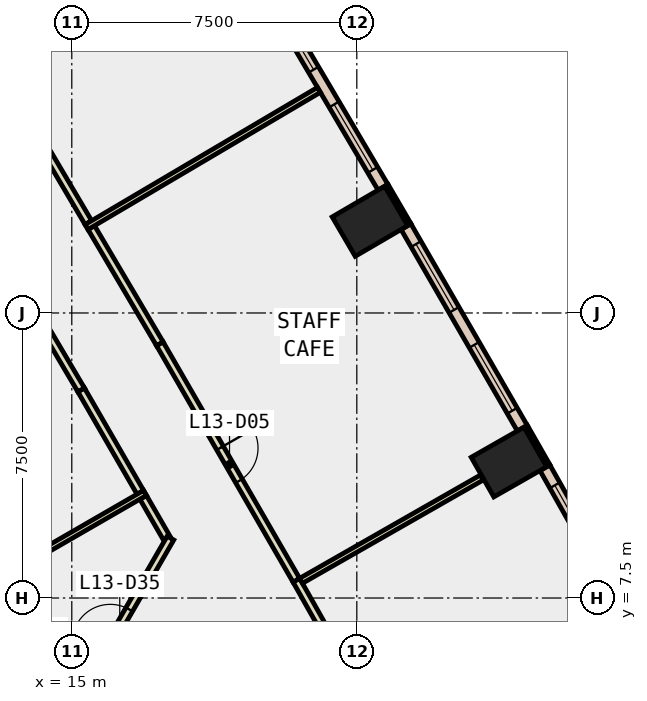
"""IFC4 building model, lengths in metres.
Left out: names, types, materials, properties, quantities, classifications, styles, units other than length and angle.
Written with IfcOpenShell. Run it as: python <this file> out.ifc"""

import sys

from ifc_helpers import new_model, si_unit, direction, frame, frame_2d, origin, origin_2d, place, context, subcontext, project, spatial, rectangle, extrude, element, fill, save


model = new_model("IFC4")
c1 = context("Model", 3, precision=1e-05, world=origin(), true_north=direction((0.0, 1.0)))
c2 = subcontext(c1, "Body", "Model", "MODEL_VIEW")
j1 = project(units=[si_unit("LENGTHUNIT", "METRE"), si_unit("PLANEANGLEUNIT", "RADIAN")], contexts=[c1])
p1 = place(None, origin())
s1 = spatial("IfcSite", under=j1, at=p1, CompositionType="ELEMENT")
p2 = place(p1, origin())
s2 = spatial("IfcBuilding", under=s1, at=p2, CompositionType="ELEMENT")
p3 = place(p2, frame((0.0, 0.0, 64.4)))
s3 = spatial("IfcBuildingStorey", under=s2, at=p3, CompositionType="ELEMENT", Elevation=64.4)
for number, where, z_axis, x_axis in (
    (1, (26.503, 11.078, -0.4), (0.0, 0.0, 1.0), (-0.496, 0.869, 0.0)),
    (2, (22.846, 17.413, -0.4), (0.0, 0.0, 1.0), (-0.504, 0.864, 0.0)),
):
    element("IfcColumn", number, at=place(p3, frame(where, z_axis=z_axis, x_axis=x_axis)), inside=s3, PredefinedType="COLUMN", context=c2, shape_type="SweptSolid", body=[
        extrude(rectangle(XDim=1.2, YDim=1.6, at=origin_2d()), origin(), (0.0, 0.0, 1.0), 4.2),
    ])
p4 = place(p3, frame((27.539, 10.978, 0.0), z_axis=(0.0, 0.0, 1.0), x_axis=(-0.495854054996, 0.868405870629, 0.0)))
e3 = element("IfcWall", 3, at=p4, inside=s3, PredefinedType="STANDARD", context=c2, shape_type="SweptSolid", body=[
    extrude(rectangle(XDim=1.2, YDim=0.1, at=frame_2d((0.6, 0.0))), origin(), (0.0, 0.0, 1.0), 3.8),
])
p5 = place(p3, frame((23.882, 17.324, 0.0), z_axis=(0.0, 0.0, 1.0), x_axis=(-0.504225229382, 0.863572184623, 0.0)))
e4 = element("IfcWall", 4, at=p5, inside=s3, PredefinedType="STANDARD", context=c2, shape_type="SweptSolid", body=[
    extrude(rectangle(XDim=1.2, YDim=0.1, at=frame_2d((0.6, 0.0))), origin(), (0.0, 0.0, 1.0), 3.8),
])
p6 = place(p3, frame((30.462, 5.595, 0.0), z_axis=(0.0, 0.0, 1.0), x_axis=(-0.491887822214, 0.870658584267, 0.0)))
e5 = element("IfcWall", 5, at=p6, inside=s3, PredefinedType="STANDARD", context=c2, shape_type="SweptSolid", body=[
    extrude(rectangle(XDim=6.125, YDim=0.3, at=frame_2d((3.062, 0.0))), origin(), (0.0, 0.0, 1.0), 3.8),
])
p7 = place(p6, frame((0.531, 0.0, 0.9)))
e6 = element("IfcOpeningElement", 6, at=p7, cuts=e5, PredefinedType="OPENING", context=c2, shape_type="SweptSolid", body=[
    extrude(rectangle(XDim=2.0, YDim=2.6, at=frame_2d((1.0, 1.3))), frame((0.0, 0.16, 0.0), z_axis=(0.0, -1.0, 0.0), x_axis=(1.0, 0.0, 0.0)), (0.0, 0.0, 1.0), 0.32),
])
p8 = place(p6, frame((3.594, 0.0, 0.9)))
e7 = element("IfcOpeningElement", 7, at=p8, cuts=e5, PredefinedType="OPENING", context=c2, shape_type="SweptSolid", body=[
    extrude(rectangle(XDim=2.0, YDim=2.6, at=frame_2d((1.0, 1.3))), frame((0.0, 0.16, 0.0), z_axis=(0.0, -1.0, 0.0), x_axis=(1.0, 0.0, 0.0)), (0.0, 0.0, 1.0), 0.32),
])
p9 = place(p3, frame((26.855, 11.968, 0.0), z_axis=(0.0, 0.0, 1.0), x_axis=(-0.499903021601, 0.86608138705, 0.0)))
e8 = element("IfcWall", 8, at=p9, inside=s3, PredefinedType="STANDARD", context=c2, shape_type="SweptSolid", body=[
    extrude(rectangle(XDim=6.125, YDim=0.3, at=frame_2d((3.062, 0.0))), origin(), (0.0, 0.0, 1.0), 3.8),
])
p10 = place(p9, frame((0.531, 0.0, 0.9)))
e9 = element("IfcOpeningElement", 9, at=p10, cuts=e8, PredefinedType="OPENING", context=c2, shape_type="SweptSolid", body=[
    extrude(rectangle(XDim=2.0, YDim=2.6, at=frame_2d((1.0, 1.3))), frame((0.0, 0.16, 0.0), z_axis=(0.0, -1.0, 0.0), x_axis=(1.0, 0.0, 0.0)), (0.0, 0.0, 1.0), 0.32),
])
p11 = place(p9, frame((3.594, 0.0, 0.9)))
e10 = element("IfcOpeningElement", 10, at=p11, cuts=e8, PredefinedType="OPENING", context=c2, shape_type="SweptSolid", body=[
    extrude(rectangle(XDim=2.0, YDim=2.6, at=frame_2d((1.0, 1.3))), frame((0.0, 0.16, 0.0), z_axis=(0.0, -1.0, 0.0), x_axis=(1.0, 0.0, 0.0)), (0.0, 0.0, 1.0), 0.32),
])
p12 = place(p3, frame((23.189, 18.307, 0.0), z_axis=(0.0, 0.0, 1.0), x_axis=(-0.508163938648, 0.861260362177, 0.0)))
e11 = element("IfcWall", 11, at=p12, inside=s3, PredefinedType="STANDARD", context=c2, shape_type="SweptSolid", body=[
    extrude(rectangle(XDim=6.126, YDim=0.3, at=frame_2d((3.063, 0.0))), origin(), (0.0, 0.0, 1.0), 3.8),
])
p13 = place(p12, frame((0.531, 0.0, 0.9)))
e12 = element("IfcOpeningElement", 12, at=p13, cuts=e11, PredefinedType="OPENING", context=c2, shape_type="SweptSolid", body=[
    extrude(rectangle(XDim=2.0, YDim=2.6, at=frame_2d((1.0, 1.3))), frame((0.0, 0.16, 0.0), z_axis=(0.0, -1.0, 0.0), x_axis=(1.0, 0.0, 0.0)), (0.0, 0.0, 1.0), 0.32),
])
p14 = place(p12, frame((3.594, 0.0, 0.9)))
e13 = element("IfcOpeningElement", 13, at=p14, cuts=e11, PredefinedType="OPENING", context=c2, shape_type="SweptSolid", body=[
    extrude(rectangle(XDim=2.0, YDim=2.6, at=frame_2d((1.0, 1.3))), frame((0.0, 0.16, 0.0), z_axis=(0.0, -1.0, 0.0), x_axis=(1.0, 0.0, 0.0)), (0.0, 0.0, 1.0), 0.32),
])
p15 = place(p3, frame((17.497, 9.078, 0.0), z_axis=(0.0, 0.0, 1.0), x_axis=(-0.500126451326, 0.865952384768, 0.0)))
e14 = element("IfcWall", 14, at=p15, inside=s3, PredefinedType="PARTITIONING", context=c2, shape_type="SweptSolid", body=[
    extrude(rectangle(XDim=1.238, YDim=0.2, at=frame_2d((0.619, 0.0))), origin(), (0.0, 0.0, 1.0), 3.8),
])
p16 = place(p3, frame((16.803, 10.28, 0.0), z_axis=(0.0, 0.0, 1.0), x_axis=(-0.499941881293, 0.866058956036, 0.0)))
e15 = element("IfcWall", 15, at=p16, inside=s3, PredefinedType="PARTITIONING", context=c2, shape_type="SweptSolid", body=[
    extrude(rectangle(XDim=3.114, YDim=0.2, at=frame_2d((1.557, 0.0))), origin(), (0.0, 0.0, 1.0), 3.8),
])
p17 = place(p3, frame((15.246, 12.977, 0.0), z_axis=(0.0, 0.0, 1.0), x_axis=(-0.508473864329, 0.861077423519, 0.0)))
e16 = element("IfcWall", 16, at=p17, inside=s3, PredefinedType="PARTITIONING", context=c2, shape_type="SweptSolid", body=[
    extrude(rectangle(XDim=1.9, YDim=0.2, at=frame_2d((0.95, 0.0))), origin(), (0.0, 0.0, 1.0), 3.8),
])
p18 = place(p3, frame((20.909, 7.969, 0.0), z_axis=(0.0, 0.0, 1.0), x_axis=(0.491808171064, -0.870703579225, 0.0)))
e17 = element("IfcWall", 17, at=p18, inside=s3, PredefinedType="PARTITIONING", context=c2, shape_type="SweptSolid", body=[
    extrude(rectangle(XDim=7.332, YDim=0.2, at=frame_2d((3.666, 0.0))), origin(), (0.0, 0.0, 1.0), 3.8),
])
p19 = place(p18, frame((3.166, 0.0, 0.0)))
e18 = element("IfcOpeningElement", 18, at=p19, cuts=e17, PredefinedType="OPENING", context=c2, shape_type="SweptSolid", body=[
    extrude(rectangle(XDim=1.0, YDim=2.1, at=frame_2d((0.5, 1.05))), frame((0.0, 0.11, 0.0), z_axis=(0.0, -1.0, 0.0), x_axis=(1.0, 0.0, 0.0)), (0.0, 0.0, 1.0), 0.22),
])
p20 = place(p3, frame((15.512, 17.248, 0.0), z_axis=(0.0, 0.0, 1.0), x_axis=(0.508178415101, -0.861251820564, 0.0)))
e19 = element("IfcWall", 19, at=p20, inside=s3, PredefinedType="PARTITIONING", context=c2, shape_type="SweptSolid", body=[
    extrude(rectangle(XDim=3.554, YDim=0.2, at=frame_2d((1.777, 0.0))), origin(), (0.0, 0.0, 1.0), 3.8),
])
p21 = place(p3, frame((17.318, 14.187, 0.0), z_axis=(0.0, 0.0, 1.0), x_axis=(0.499986381413, -0.866033266336, 0.0)))
e20 = element("IfcWall", 20, at=p21, inside=s3, PredefinedType="PARTITIONING", context=c2, shape_type="SweptSolid", body=[
    extrude(rectangle(XDim=7.18, YDim=0.2, at=frame_2d((3.59, 0.0))), origin(), (0.0, 0.0, 1.0), 3.8),
])
p22 = place(p21, frame((3.165, 0.0, 0.0)))
e21 = element("IfcOpeningElement", 21, at=p22, cuts=e20, PredefinedType="OPENING", context=c2, shape_type="SweptSolid", body=[
    extrude(rectangle(XDim=1.0, YDim=2.1, at=frame_2d((0.5, 1.05))), frame((0.0, 0.11, 0.0), z_axis=(0.0, -1.0, 0.0), x_axis=(1.0, 0.0, 0.0)), (0.0, 0.0, 1.0), 0.22),
])
p23 = place(p3, frame((13.63, 20.437, 0.0), z_axis=(0.0, 0.0, 1.0), x_axis=(0.508298695021, -0.861180838523, 0.0)))
e22 = element("IfcWall", 22, at=p23, inside=s3, PredefinedType="PARTITIONING", context=c2, shape_type="SweptSolid", body=[
    extrude(rectangle(XDim=3.553, YDim=0.2, at=frame_2d((1.777, 0.0))), origin(), (0.0, 0.0, 1.0), 3.8),
])
p24 = place(p3, frame((11.261, 6.994, 0.0), z_axis=(0.0, 0.0, 1.0), x_axis=(0.866043905515, 0.499967952693, 0.0)))
e23 = element("IfcWall", 23, at=p24, inside=s3, PredefinedType="PARTITIONING", context=c2, shape_type="SweptSolid", body=[
    extrude(rectangle(XDim=6.542, YDim=0.15, at=frame_2d((3.271, 0.0))), origin(), (0.0, 0.0, 1.0), 3.8),
])
p25 = place(p3, frame((13.827, 2.55, 0.0), z_axis=(0.0, 0.0, 1.0), x_axis=(0.500116794417, 0.865957961995, 0.0)))
e24 = element("IfcWall", 24, at=p25, inside=s3, PredefinedType="PARTITIONING", context=c2, shape_type="SweptSolid", body=[
    extrude(rectangle(XDim=7.538, YDim=0.2, at=frame_2d((3.769, 0.0))), origin(), (0.0, 0.0, 1.0), 3.8),
])
p26 = place(p25, frame((3.269, 0.0, 0.0)))
e25 = element("IfcOpeningElement", 25, at=p26, cuts=e24, PredefinedType="OPENING", context=c2, shape_type="SweptSolid", body=[
    extrude(rectangle(XDim=1.0, YDim=2.1, at=frame_2d((0.5, 1.05))), frame((0.0, 0.11, 0.0), z_axis=(0.0, -1.0, 0.0), x_axis=(1.0, 0.0, 0.0)), (0.0, 0.0, 1.0), 0.22),
])
p27 = place(p25, frame((4.369, 0.0, 0.0)))
e26 = element("IfcOpeningElement", 26, at=p27, cuts=e24, PredefinedType="OPENING", context=c2, shape_type="SweptSolid", body=[
    extrude(rectangle(XDim=1.0, YDim=2.1, at=frame_2d((0.5, 1.05))), frame((0.0, 0.11, 0.0), z_axis=(0.0, -1.0, 0.0), x_axis=(1.0, 0.0, 0.0)), (0.0, 0.0, 1.0), 0.22),
])
p28 = place(p3, frame((21.033, 7.953, 0.0), z_axis=(0.0, 0.0, 1.0), x_axis=(0.868311678357, 0.496018980715, 0.0)))
e27 = element("IfcWall", 27, at=p28, inside=s3, PredefinedType="PARTITIONING", context=c2, shape_type="SweptSolid", body=[
    extrude(rectangle(XDim=5.48, YDim=0.15, at=frame_2d((2.74, 0.0))), origin(), (0.0, 0.0, 1.0), 3.8),
])
p29 = place(p3, frame((15.388, 17.261, 0.0), z_axis=(0.0, 0.0, 1.0), x_axis=(0.861189945173, 0.50828326584, 0.0)))
e28 = element("IfcWall", 28, at=p29, inside=s3, PredefinedType="PARTITIONING", context=c2, shape_type="SweptSolid", body=[
    extrude(rectangle(XDim=7.101, YDim=0.15, at=frame_2d((3.55, 0.0))), origin(), (0.0, 0.0, 1.0), 3.8),
])
p30 = place(p8, origin())
e29 = element("IfcWindow", 29, at=p30, inside=s3, PartitioningType="SINGLE_PANEL", PredefinedType="WINDOW", context=c2, shape_type="SweptSolid", body=[
    extrude(rectangle(XDim=2.0, YDim=2.6, at=frame_2d((1.0, 1.3))), frame((0.0, 0.03, 0.0), z_axis=(0.0, -1.0, 0.0), x_axis=(1.0, 0.0, 0.0)), (0.0, 0.0, 1.0), 0.06),
])
fill(e7, e29)
p31 = place(p10, origin())
e30 = element("IfcWindow", 30, at=p31, inside=s3, PartitioningType="SINGLE_PANEL", PredefinedType="WINDOW", context=c2, shape_type="SweptSolid", body=[
    extrude(rectangle(XDim=2.0, YDim=2.6, at=frame_2d((1.0, 1.3))), frame((0.0, 0.03, 0.0), z_axis=(0.0, -1.0, 0.0), x_axis=(1.0, 0.0, 0.0)), (0.0, 0.0, 1.0), 0.06),
])
fill(e9, e30)
p32 = place(p11, origin())
e31 = element("IfcWindow", 31, at=p32, inside=s3, PartitioningType="SINGLE_PANEL", PredefinedType="WINDOW", context=c2, shape_type="SweptSolid", body=[
    extrude(rectangle(XDim=2.0, YDim=2.6, at=frame_2d((1.0, 1.3))), frame((0.0, 0.03, 0.0), z_axis=(0.0, -1.0, 0.0), x_axis=(1.0, 0.0, 0.0)), (0.0, 0.0, 1.0), 0.06),
])
fill(e10, e31)
p33 = place(p13, origin())
e32 = element("IfcWindow", 32, at=p33, inside=s3, PartitioningType="SINGLE_PANEL", PredefinedType="WINDOW", context=c2, shape_type="SweptSolid", body=[
    extrude(rectangle(XDim=2.0, YDim=2.6, at=frame_2d((1.0, 1.3))), frame((0.0, 0.03, 0.0), z_axis=(0.0, -1.0, 0.0), x_axis=(1.0, 0.0, 0.0)), (0.0, 0.0, 1.0), 0.06),
])
fill(e12, e32)
p34 = place(p14, origin())
e33 = element("IfcWindow", 33, at=p34, inside=s3, PartitioningType="SINGLE_PANEL", PredefinedType="WINDOW", context=c2, shape_type="SweptSolid", body=[
    extrude(rectangle(XDim=2.0, YDim=2.6, at=frame_2d((1.0, 1.3))), frame((0.0, 0.03, 0.0), z_axis=(0.0, -1.0, 0.0), x_axis=(1.0, 0.0, 0.0)), (0.0, 0.0, 1.0), 0.06),
])
fill(e13, e33)
p35 = place(p22, origin())
e34 = element("IfcDoor", 34, at=p35, inside=s3, OperationType="SINGLE_SWING_LEFT", PredefinedType="DOOR", context=c2, shape_type="SweptSolid", body=[
    extrude(rectangle(XDim=1.0, YDim=2.1, at=frame_2d((0.5, 1.05))), frame((0.0, 0.025, 0.0), z_axis=(0.0, -1.0, 0.0), x_axis=(1.0, 0.0, 0.0)), (0.0, 0.0, 1.0), 0.05),
])
fill(e21, e34)
p36 = place(p27, origin())
e35 = element("IfcDoor", 35, at=p36, inside=s3, OperationType="SINGLE_SWING_RIGHT", PredefinedType="DOOR", context=c2, shape_type="SweptSolid", body=[
    extrude(rectangle(XDim=1.0, YDim=2.1, at=frame_2d((0.5, 1.05))), frame((0.0, 0.025, 0.0), z_axis=(0.0, -1.0, 0.0), x_axis=(1.0, 0.0, 0.0)), (0.0, 0.0, 1.0), 0.05),
])
fill(e26, e35)
save(model, sys.argv[1])
